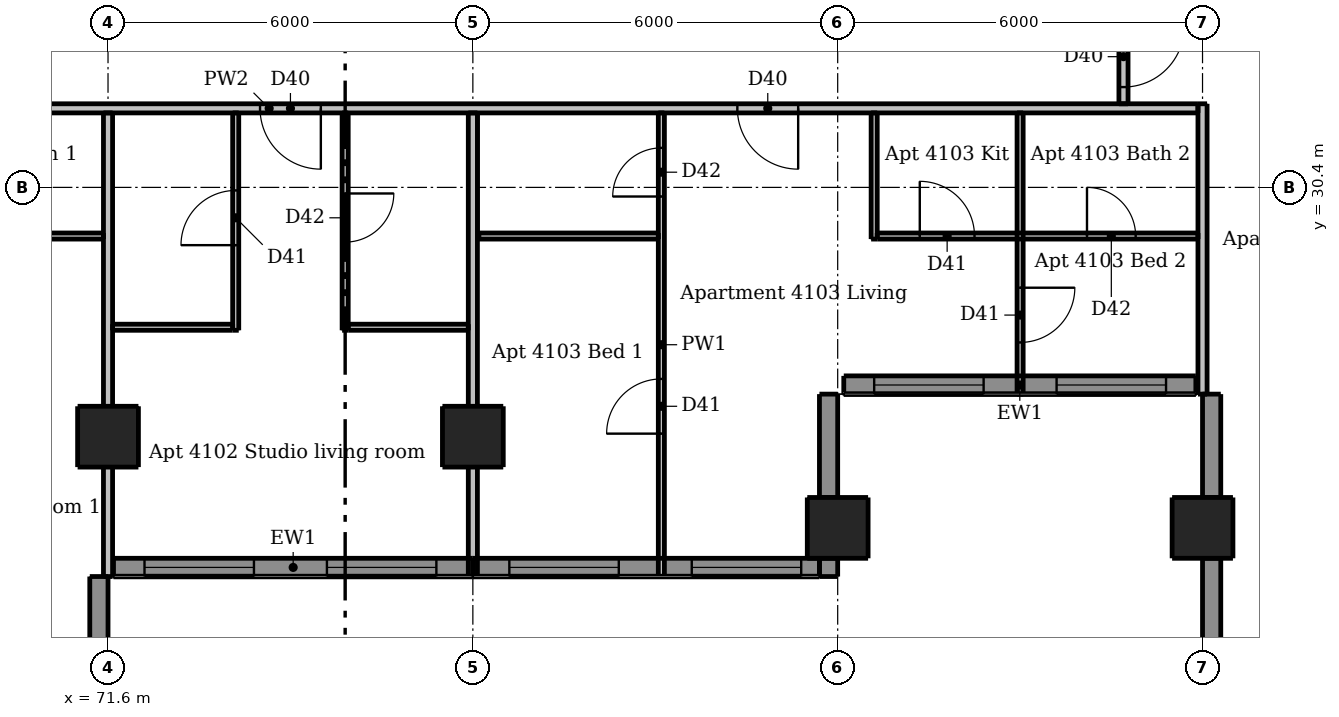
"""IFC4 building model, lengths in metres.
Left out: names, types, materials, properties, quantities, classifications, styles, units other than length and angle.
Written with IfcOpenShell. Run it as: python <this file> out.ifc"""

import sys

from ifc_helpers import new_model, si_unit, direction, frame, frame_2d, origin, origin_2d, place, context, subcontext, project, spatial, rectangle, extrude, element, fill, save


model = new_model("IFC4")
c1 = context("Model", 3, precision=1e-05, world=origin(), true_north=direction((0.0, 1.0)))
c2 = subcontext(c1, "Body", "Model", "MODEL_VIEW")
j1 = project(units=[si_unit("LENGTHUNIT", "METRE"), si_unit("PLANEANGLEUNIT", "RADIAN")], contexts=[c1])
p1 = place(None, origin())
s1 = spatial("IfcSite", under=j1, at=p1, CompositionType="ELEMENT")
p2 = place(p1, origin())
s2 = spatial("IfcBuilding", under=s1, at=p2, CompositionType="ELEMENT")
p3 = place(p2, frame((0.0, 0.0, 154.9)))
s3 = spatial("IfcBuildingStorey", under=s2, at=p3, CompositionType="ELEMENT", Elevation=154.9)
for number, where, z_axis, x_axis in (
    (1, (71.6, 26.3, 0.0), (0.0, 0.0, 1.0), (1.0, 0.0, 0.0)),
    (2, (77.6, 26.3, 0.0), (0.0, 0.0, 1.0), (1.0, 0.0, 0.0)),
    (3, (83.6, 24.8, 0.0), (0.0, 0.0, 1.0), (1.0, 0.0, 0.0)),
    (4, (89.6, 24.8, 0.0), (0.0, 0.0, 1.0), (1.0, 0.0, 0.0)),
):
    element("IfcColumn", number, at=place(p3, frame(where, z_axis=z_axis, x_axis=x_axis)), inside=s3, PredefinedType="COLUMN", context=c2, shape_type="SweptSolid", body=[
        extrude(rectangle(XDim=1.0, YDim=1.0, at=origin_2d()), origin(), (0.0, 0.0, 1.0), 3.05),
    ])
p4 = place(p3, frame((71.45, 22.5, 0.0), z_axis=(0.0, 0.0, 1.0), x_axis=(0.0, 1.0, 0.0)))
e5 = element("IfcWall", 5, at=p4, inside=s3, PredefinedType="SOLIDWALL", context=c2, shape_type="SweptSolid", body=[
    extrude(rectangle(XDim=1.5, YDim=0.3, at=frame_2d((0.75, 0.0))), origin(), (0.0, 0.0, 1.0), 3.05),
])
p5 = place(p3, frame((83.45, 24.0, 0.0), z_axis=(0.0, 0.0, 1.0), x_axis=(0.0, 1.0, 0.0)))
e6 = element("IfcWall", 6, at=p5, inside=s3, PredefinedType="SOLIDWALL", context=c2, shape_type="SweptSolid", body=[
    extrude(rectangle(XDim=0.3, YDim=0.3, at=frame_2d((0.15, 0.0))), origin(), (0.0, 0.0, 1.0), 3.05),
])
for number, where, z_axis, x_axis in (
    (7, (83.45, 25.3, 0.0), (0.0, 0.0, 1.0), (0.0, 1.0, 0.0)),
    (8, (89.75, 27.0, 0.0), (0.0, 0.0, 1.0), (0.0, -1.0, 0.0)),
):
    element("IfcWall", number, at=place(p3, frame(where, z_axis=z_axis, x_axis=x_axis)), inside=s3, PredefinedType="SOLIDWALL", context=c2, shape_type="SweptSolid", body=[
        extrude(rectangle(XDim=1.7, YDim=0.3, at=frame_2d((0.85, 0.0))), origin(), (0.0, 0.0, 1.0), 3.05),
    ])
p6 = place(p3, frame((89.75, 24.3, 0.0), z_axis=(0.0, 0.0, 1.0), x_axis=(0.0, -1.0, 0.0)))
e9 = element("IfcWall", 9, at=p6, inside=s3, PredefinedType="SOLIDWALL", context=c2, shape_type="SweptSolid", body=[
    extrude(rectangle(XDim=1.8, YDim=0.3, at=frame_2d((0.9, 0.0))), origin(), (0.0, 0.0, 1.0), 3.05),
])
p7 = place(p3, frame((71.69, 24.15, 0.0), z_axis=(0.0, 0.0, 1.0), x_axis=(1.0, 0.0, 0.0)))
e10 = element("IfcWall", 10, at=p7, inside=s3, PredefinedType="SOLIDWALL", context=c2, shape_type="SweptSolid", body=[
    extrude(rectangle(XDim=5.91, YDim=0.3, at=frame_2d((2.955, 0.0))), origin(), (0.0, 0.0, 1.0), 3.05),
])
p8 = place(p7, frame((0.51, 0.0, 0.15)))
e11 = element("IfcOpeningElement", 11, at=p8, cuts=e10, PredefinedType="OPENING", context=c2, shape_type="SweptSolid", body=[
    extrude(rectangle(XDim=1.8, YDim=2.1, at=frame_2d((0.9, 1.05))), frame((0.0, 0.16, 0.0), z_axis=(0.0, -1.0, 0.0), x_axis=(1.0, 0.0, 0.0)), (0.0, 0.0, 1.0), 0.32),
])
p9 = place(p7, frame((3.51, 0.0, 0.15)))
e12 = element("IfcOpeningElement", 12, at=p9, cuts=e10, PredefinedType="OPENING", context=c2, shape_type="SweptSolid", body=[
    extrude(rectangle(XDim=1.8, YDim=2.1, at=frame_2d((0.9, 1.05))), frame((0.0, 0.16, 0.0), z_axis=(0.0, -1.0, 0.0), x_axis=(1.0, 0.0, 0.0)), (0.0, 0.0, 1.0), 0.32),
])
p10 = place(p3, frame((77.6, 24.15, 0.0), z_axis=(0.0, 0.0, 1.0), x_axis=(1.0, 0.0, 0.0)))
e13 = element("IfcWall", 13, at=p10, inside=s3, PredefinedType="SOLIDWALL", context=c2, shape_type="SweptSolid", body=[
    extrude(rectangle(XDim=5.7, YDim=0.3, at=frame_2d((2.85, 0.0))), origin(), (0.0, 0.0, 1.0), 3.05),
])
p11 = place(p10, frame((0.6, 0.0, 0.15)))
e14 = element("IfcOpeningElement", 14, at=p11, cuts=e13, PredefinedType="OPENING", context=c2, shape_type="SweptSolid", body=[
    extrude(rectangle(XDim=1.8, YDim=2.1, at=frame_2d((0.9, 1.05))), frame((0.0, 0.16, 0.0), z_axis=(0.0, -1.0, 0.0), x_axis=(1.0, 0.0, 0.0)), (0.0, 0.0, 1.0), 0.32),
])
p12 = place(p10, frame((3.6, 0.0, 0.15)))
e15 = element("IfcOpeningElement", 15, at=p12, cuts=e13, PredefinedType="OPENING", context=c2, shape_type="SweptSolid", body=[
    extrude(rectangle(XDim=1.8, YDim=2.1, at=frame_2d((0.9, 1.05))), frame((0.0, 0.16, 0.0), z_axis=(0.0, -1.0, 0.0), x_axis=(1.0, 0.0, 0.0)), (0.0, 0.0, 1.0), 0.32),
])
p13 = place(p3, frame((83.7, 27.15, 0.0), z_axis=(0.0, 0.0, 1.0), x_axis=(1.0, 0.0, 0.0)))
e16 = element("IfcWall", 16, at=p13, inside=s3, PredefinedType="SOLIDWALL", context=c2, shape_type="SweptSolid", body=[
    extrude(rectangle(XDim=5.79, YDim=0.3, at=frame_2d((2.895, 0.0))), origin(), (0.0, 0.0, 1.0), 3.05),
])
p14 = place(p13, frame((0.5, 0.0, 0.15)))
e17 = element("IfcOpeningElement", 17, at=p14, cuts=e16, PredefinedType="OPENING", context=c2, shape_type="SweptSolid", body=[
    extrude(rectangle(XDim=1.8, YDim=2.1, at=frame_2d((0.9, 1.05))), frame((0.0, 0.16, 0.0), z_axis=(0.0, -1.0, 0.0), x_axis=(1.0, 0.0, 0.0)), (0.0, 0.0, 1.0), 0.32),
])
p15 = place(p13, frame((3.5, 0.0, 0.15)))
e18 = element("IfcOpeningElement", 18, at=p15, cuts=e16, PredefinedType="OPENING", context=c2, shape_type="SweptSolid", body=[
    extrude(rectangle(XDim=1.8, YDim=2.1, at=frame_2d((0.9, 1.05))), frame((0.0, 0.16, 0.0), z_axis=(0.0, -1.0, 0.0), x_axis=(1.0, 0.0, 0.0)), (0.0, 0.0, 1.0), 0.32),
])
p16 = place(p3, frame((73.7, 28.05, 0.0), z_axis=(0.0, 0.0, 1.0), x_axis=(0.0, 1.0, 0.0)))
e19 = element("IfcWall", 19, at=p16, inside=s3, PredefinedType="PARTITIONING", context=c2, shape_type="SweptSolid", body=[
    extrude(rectangle(XDim=3.575, YDim=0.1, at=frame_2d((1.788, 0.0))), origin(), (0.0, 0.0, 1.0), 3.05),
])
p17 = place(p16, frame((1.4, 0.0, 0.0)))
e20 = element("IfcOpeningElement", 20, at=p17, cuts=e19, PredefinedType="OPENING", context=c2, shape_type="SweptSolid", body=[
    extrude(rectangle(XDim=0.9, YDim=2.1, at=frame_2d((0.45, 1.05))), frame((0.0, 0.06, 0.0), z_axis=(0.0, -1.0, 0.0), x_axis=(1.0, 0.0, 0.0)), (0.0, 0.0, 1.0), 0.12),
])
p18 = place(p3, frame((75.5, 31.625, 0.0), z_axis=(0.0, 0.0, 1.0), x_axis=(0.0, -1.0, 0.0)))
e21 = element("IfcWall", 21, at=p18, inside=s3, PredefinedType="PARTITIONING", context=c2, shape_type="SweptSolid", body=[
    extrude(rectangle(XDim=3.575, YDim=0.1, at=frame_2d((1.788, 0.0))), origin(), (0.0, 0.0, 1.0), 3.05),
])
p19 = place(p18, frame((1.325, 0.0, 0.0)))
e22 = element("IfcOpeningElement", 22, at=p19, cuts=e21, PredefinedType="OPENING", context=c2, shape_type="SweptSolid", body=[
    extrude(rectangle(XDim=0.8, YDim=2.1, at=frame_2d((0.4, 1.05))), frame((0.0, 0.06, 0.0), z_axis=(0.0, -1.0, 0.0), x_axis=(1.0, 0.0, 0.0)), (0.0, 0.0, 1.0), 0.12),
])
p20 = place(p3, frame((80.7, 24.0, 0.0), z_axis=(0.0, 0.0, 1.0), x_axis=(0.0, 1.0, 0.0)))
e23 = element("IfcWall", 23, at=p20, inside=s3, PredefinedType="PARTITIONING", context=c2, shape_type="SweptSolid", body=[
    extrude(rectangle(XDim=7.625, YDim=0.1, at=frame_2d((3.812, 0.0))), origin(), (0.0, 0.0, 1.0), 3.05),
])
p21 = place(p20, frame((2.35, 0.0, 0.0)))
e24 = element("IfcOpeningElement", 24, at=p21, cuts=e23, PredefinedType="OPENING", context=c2, shape_type="SweptSolid", body=[
    extrude(rectangle(XDim=0.9, YDim=2.1, at=frame_2d((0.45, 1.05))), frame((0.0, 0.06, 0.0), z_axis=(0.0, -1.0, 0.0), x_axis=(1.0, 0.0, 0.0)), (0.0, 0.0, 1.0), 0.12),
])
p22 = place(p20, frame((6.25, 0.0, 0.0)))
e25 = element("IfcOpeningElement", 25, at=p22, cuts=e23, PredefinedType="OPENING", context=c2, shape_type="SweptSolid", body=[
    extrude(rectangle(XDim=0.8, YDim=2.1, at=frame_2d((0.4, 1.05))), frame((0.0, 0.06, 0.0), z_axis=(0.0, -1.0, 0.0), x_axis=(1.0, 0.0, 0.0)), (0.0, 0.0, 1.0), 0.12),
])
p23 = place(p3, frame((84.2, 29.55, 0.0), z_axis=(0.0, 0.0, 1.0), x_axis=(0.0, 1.0, 0.0)))
e26 = element("IfcWall", 26, at=p23, inside=s3, PredefinedType="PARTITIONING", context=c2, shape_type="SweptSolid", body=[
    extrude(rectangle(XDim=2.075, YDim=0.1, at=frame_2d((1.038, 0.0))), origin(), (0.0, 0.0, 1.0), 3.05),
])
p24 = place(p3, frame((86.6, 31.625, 0.0), z_axis=(0.0, 0.0, 1.0), x_axis=(0.0, -1.0, 0.0)))
e27 = element("IfcWall", 27, at=p24, inside=s3, PredefinedType="PARTITIONING", context=c2, shape_type="SweptSolid", body=[
    extrude(rectangle(XDim=4.625, YDim=0.1, at=frame_2d((2.312, 0.0))), origin(), (0.0, 0.0, 1.0), 3.05),
])
p25 = place(p24, frame((2.875, 0.0, 0.0)))
e28 = element("IfcOpeningElement", 28, at=p25, cuts=e27, PredefinedType="OPENING", context=c2, shape_type="SweptSolid", body=[
    extrude(rectangle(XDim=0.9, YDim=2.1, at=frame_2d((0.45, 1.05))), frame((0.0, 0.06, 0.0), z_axis=(0.0, -1.0, 0.0), x_axis=(1.0, 0.0, 0.0)), (0.0, 0.0, 1.0), 0.12),
])
p26 = place(p3, frame((65.65, 29.6, 0.0), z_axis=(0.0, 0.0, 1.0), x_axis=(1.0, 0.0, 0.0)))
e29 = element("IfcWall", 29, at=p26, inside=s3, PredefinedType="PARTITIONING", context=c2, shape_type="SweptSolid", body=[
    extrude(rectangle(XDim=5.875, YDim=0.1, at=frame_2d((2.938, 0.0))), origin(), (0.0, 0.0, 1.0), 3.05),
])
p27 = place(p26, frame((3.75, 0.0, 0.0)))
e30 = element("IfcOpeningElement", 30, at=p27, cuts=e29, PredefinedType="OPENING", context=c2, shape_type="SweptSolid", body=[
    extrude(rectangle(XDim=0.8, YDim=2.1, at=frame_2d((0.4, 1.05))), frame((0.0, 0.06, 0.0), z_axis=(0.0, -1.0, 0.0), x_axis=(1.0, 0.0, 0.0)), (0.0, 0.0, 1.0), 0.12),
])
p28 = place(p3, frame((77.7, 29.6, 0.0), z_axis=(0.0, 0.0, 1.0), x_axis=(1.0, 0.0, 0.0)))
e31 = element("IfcWall", 31, at=p28, inside=s3, PredefinedType="PARTITIONING", context=c2, shape_type="SweptSolid", body=[
    extrude(rectangle(XDim=2.95, YDim=0.1, at=frame_2d((1.475, 0.0))), origin(), (0.0, 0.0, 1.0), 3.05),
])
p29 = place(p3, frame((84.25, 29.6, 0.0), z_axis=(0.0, 0.0, 1.0), x_axis=(1.0, 0.0, 0.0)))
e32 = element("IfcWall", 32, at=p29, inside=s3, PredefinedType="PARTITIONING", context=c2, shape_type="SweptSolid", body=[
    extrude(rectangle(XDim=5.275, YDim=0.1, at=frame_2d((2.637, 0.0))), origin(), (0.0, 0.0, 1.0), 3.05),
])
p30 = place(p29, frame((0.7, 0.0, 0.0)))
e33 = element("IfcOpeningElement", 33, at=p30, cuts=e32, PredefinedType="OPENING", context=c2, shape_type="SweptSolid", body=[
    extrude(rectangle(XDim=0.9, YDim=2.1, at=frame_2d((0.45, 1.05))), frame((0.0, 0.06, 0.0), z_axis=(0.0, -1.0, 0.0), x_axis=(1.0, 0.0, 0.0)), (0.0, 0.0, 1.0), 0.12),
])
p31 = place(p29, frame((3.45, 0.0, 0.0)))
e34 = element("IfcOpeningElement", 34, at=p31, cuts=e32, PredefinedType="OPENING", context=c2, shape_type="SweptSolid", body=[
    extrude(rectangle(XDim=0.8, YDim=2.1, at=frame_2d((0.4, 1.05))), frame((0.0, 0.06, 0.0), z_axis=(0.0, -1.0, 0.0), x_axis=(1.0, 0.0, 0.0)), (0.0, 0.0, 1.0), 0.12),
])
for number, where, z_axis, x_axis in (
    (35, (71.675, 28.1, 0.0), (0.0, 0.0, 1.0), (1.0, 0.0, 0.0)),
    (36, (75.55, 28.1, 0.0), (0.0, 0.0, 1.0), (1.0, 0.0, 0.0)),
):
    element("IfcWall", number, at=place(p3, frame(where, z_axis=z_axis, x_axis=x_axis)), inside=s3, PredefinedType="PARTITIONING", context=c2, shape_type="SweptSolid", body=[
        extrude(rectangle(XDim=1.975, YDim=0.1, at=frame_2d((0.987, 0.0))), origin(), (0.0, 0.0, 1.0), 3.05),
    ])
for number, where, z_axis, x_axis in (
    (37, (71.6, 24.0, 0.0), (0.0, 0.0, 1.0), (0.0, 1.0, 0.0)),
    (38, (77.6, 24.0, 0.0), (0.0, 0.0, 1.0), (0.0, 1.0, 0.0)),
):
    element("IfcWall", number, at=place(p3, frame(where, z_axis=z_axis, x_axis=x_axis)), inside=s3, PredefinedType="PARTITIONING", context=c2, shape_type="SweptSolid", body=[
        extrude(rectangle(XDim=7.625, YDim=0.15, at=frame_2d((3.812, 0.0))), origin(), (0.0, 0.0, 1.0), 2.59),
    ])
p32 = place(p3, frame((88.3, 61.175, 0.0), z_axis=(0.0, 0.0, 1.0), x_axis=(0.0, -1.0, 0.0)))
e39 = element("IfcWall", 39, at=p32, inside=s3, PredefinedType="PARTITIONING", context=c2, shape_type="SweptSolid", body=[
    extrude(rectangle(XDim=29.4, YDim=0.15, at=frame_2d((14.7, 0.0))), origin(), (0.0, 0.0, 1.0), 3.05),
])
p33 = place(p32, frame((28.125, 0.0, 0.0)))
e40 = element("IfcOpeningElement", 40, at=p33, cuts=e39, PredefinedType="OPENING", context=c2, shape_type="SweptSolid", body=[
    extrude(rectangle(XDim=1.0, YDim=2.1, at=frame_2d((0.5, 1.05))), frame((0.0, 0.085, 0.0), z_axis=(0.0, -1.0, 0.0), x_axis=(1.0, 0.0, 0.0)), (0.0, 0.0, 1.0), 0.17),
])
p34 = place(p32, frame((18.275, 0.0, 0.0)))
e41 = element("IfcOpeningElement", 41, at=p34, cuts=e39, PredefinedType="OPENING", context=c2, shape_type="SweptSolid", body=[
    extrude(rectangle(XDim=1.0, YDim=2.1, at=frame_2d((0.5, 1.05))), frame((0.0, 0.085, 0.0), z_axis=(0.0, -1.0, 0.0), x_axis=(1.0, 0.0, 0.0)), (0.0, 0.0, 1.0), 0.17),
])
p35 = place(p32, frame((10.475, 0.0, 0.0)))
e42 = element("IfcOpeningElement", 42, at=p35, cuts=e39, PredefinedType="OPENING", context=c2, shape_type="SweptSolid", body=[
    extrude(rectangle(XDim=1.0, YDim=2.1, at=frame_2d((0.5, 1.05))), frame((0.0, 0.085, 0.0), z_axis=(0.0, -1.0, 0.0), x_axis=(1.0, 0.0, 0.0)), (0.0, 0.0, 1.0), 0.17),
])
p36 = place(p32, frame((3.275, 0.0, 0.0)))
e43 = element("IfcOpeningElement", 43, at=p36, cuts=e39, PredefinedType="OPENING", context=c2, shape_type="SweptSolid", body=[
    extrude(rectangle(XDim=1.0, YDim=2.1, at=frame_2d((0.5, 1.05))), frame((0.0, 0.085, 0.0), z_axis=(0.0, -1.0, 0.0), x_axis=(1.0, 0.0, 0.0)), (0.0, 0.0, 1.0), 0.17),
])
p37 = place(p3, frame((89.6, 27.0, 0.0), z_axis=(0.0, 0.0, 1.0), x_axis=(0.0, 1.0, 0.0)))
e44 = element("IfcWall", 44, at=p37, inside=s3, PredefinedType="PARTITIONING", context=c2, shape_type="SweptSolid", body=[
    extrude(rectangle(XDim=4.775, YDim=0.15, at=frame_2d((2.387, 0.0))), origin(), (0.0, 0.0, 1.0), 2.51),
])
p38 = place(p3, frame((89.525, 31.7, 0.0), z_axis=(0.0, 0.0, 1.0), x_axis=(-1.0, 0.0, 0.0)))
e45 = element("IfcWall", 45, at=p38, inside=s3, PredefinedType="PARTITIONING", context=c2, shape_type="SweptSolid", body=[
    extrude(rectangle(XDim=30.55, YDim=0.15, at=frame_2d((15.275, 0.0))), origin(), (0.0, 0.0, 1.0), 3.05),
])
p39 = place(p38, frame((26.775, 0.0, 0.0)))
e46 = element("IfcOpeningElement", 46, at=p39, cuts=e45, PredefinedType="OPENING", context=c2, shape_type="SweptSolid", body=[
    extrude(rectangle(XDim=1.0, YDim=2.1, at=frame_2d((0.5, 1.05))), frame((0.0, 0.085, 0.0), z_axis=(0.0, -1.0, 0.0), x_axis=(1.0, 0.0, 0.0)), (0.0, 0.0, 1.0), 0.17),
])
p40 = place(p38, frame((14.425, 0.0, 0.0)))
e47 = element("IfcOpeningElement", 47, at=p40, cuts=e45, PredefinedType="OPENING", context=c2, shape_type="SweptSolid", body=[
    extrude(rectangle(XDim=1.0, YDim=2.1, at=frame_2d((0.5, 1.05))), frame((0.0, 0.085, 0.0), z_axis=(0.0, -1.0, 0.0), x_axis=(1.0, 0.0, 0.0)), (0.0, 0.0, 1.0), 0.17),
])
p41 = place(p38, frame((6.575, 0.0, 0.0)))
e48 = element("IfcOpeningElement", 48, at=p41, cuts=e45, PredefinedType="OPENING", context=c2, shape_type="SweptSolid", body=[
    extrude(rectangle(XDim=1.0, YDim=2.1, at=frame_2d((0.5, 1.05))), frame((0.0, 0.085, 0.0), z_axis=(0.0, -1.0, 0.0), x_axis=(1.0, 0.0, 0.0)), (0.0, 0.0, 1.0), 0.17),
])
p42 = place(p8, origin())
e49 = element("IfcWindow", 49, at=p42, inside=s3, PartitioningType="DOUBLE_PANEL_VERTICAL", PredefinedType="WINDOW", context=c2, shape_type="SweptSolid", body=[
    extrude(rectangle(XDim=1.8, YDim=2.1, at=frame_2d((0.9, 1.05))), frame((0.0, 0.03, 0.0), z_axis=(0.0, -1.0, 0.0), x_axis=(1.0, 0.0, 0.0)), (0.0, 0.0, 1.0), 0.06),
])
fill(e11, e49)
p43 = place(p9, origin())
e50 = element("IfcWindow", 50, at=p43, inside=s3, PartitioningType="DOUBLE_PANEL_VERTICAL", PredefinedType="WINDOW", context=c2, shape_type="SweptSolid", body=[
    extrude(rectangle(XDim=1.8, YDim=2.1, at=frame_2d((0.9, 1.05))), frame((0.0, 0.03, 0.0), z_axis=(0.0, -1.0, 0.0), x_axis=(1.0, 0.0, 0.0)), (0.0, 0.0, 1.0), 0.06),
])
fill(e12, e50)
p44 = place(p11, origin())
e51 = element("IfcWindow", 51, at=p44, inside=s3, PartitioningType="DOUBLE_PANEL_VERTICAL", PredefinedType="WINDOW", context=c2, shape_type="SweptSolid", body=[
    extrude(rectangle(XDim=1.8, YDim=2.1, at=frame_2d((0.9, 1.05))), frame((0.0, 0.03, 0.0), z_axis=(0.0, -1.0, 0.0), x_axis=(1.0, 0.0, 0.0)), (0.0, 0.0, 1.0), 0.06),
])
fill(e14, e51)
p45 = place(p12, origin())
e52 = element("IfcWindow", 52, at=p45, inside=s3, PartitioningType="DOUBLE_PANEL_VERTICAL", PredefinedType="WINDOW", context=c2, shape_type="SweptSolid", body=[
    extrude(rectangle(XDim=1.8, YDim=2.1, at=frame_2d((0.9, 1.05))), frame((0.0, 0.03, 0.0), z_axis=(0.0, -1.0, 0.0), x_axis=(1.0, 0.0, 0.0)), (0.0, 0.0, 1.0), 0.06),
])
fill(e15, e52)
p46 = place(p14, origin())
e53 = element("IfcWindow", 53, at=p46, inside=s3, PartitioningType="DOUBLE_PANEL_VERTICAL", PredefinedType="WINDOW", context=c2, shape_type="SweptSolid", body=[
    extrude(rectangle(XDim=1.8, YDim=2.1, at=frame_2d((0.9, 1.05))), frame((0.0, 0.03, 0.0), z_axis=(0.0, -1.0, 0.0), x_axis=(1.0, 0.0, 0.0)), (0.0, 0.0, 1.0), 0.06),
])
fill(e17, e53)
p47 = place(p15, origin())
e54 = element("IfcWindow", 54, at=p47, inside=s3, PartitioningType="DOUBLE_PANEL_VERTICAL", PredefinedType="WINDOW", context=c2, shape_type="SweptSolid", body=[
    extrude(rectangle(XDim=1.8, YDim=2.1, at=frame_2d((0.9, 1.05))), frame((0.0, 0.03, 0.0), z_axis=(0.0, -1.0, 0.0), x_axis=(1.0, 0.0, 0.0)), (0.0, 0.0, 1.0), 0.06),
])
fill(e18, e54)
p48 = place(p40, origin())
e55 = element("IfcDoor", 55, at=p48, inside=s3, OperationType="SINGLE_SWING_LEFT", PredefinedType="DOOR", context=c2, shape_type="SweptSolid", body=[
    extrude(rectangle(XDim=1.0, YDim=2.1, at=frame_2d((0.5, 1.05))), frame((0.0, 0.025, 0.0), z_axis=(0.0, -1.0, 0.0), x_axis=(1.0, 0.0, 0.0)), (0.0, 0.0, 1.0), 0.05),
])
fill(e47, e55)
p49 = place(p17, origin())
e56 = element("IfcDoor", 56, at=p49, inside=s3, OperationType="SINGLE_SWING_LEFT", PredefinedType="DOOR", context=c2, shape_type="SweptSolid", body=[
    extrude(rectangle(XDim=0.9, YDim=2.1, at=frame_2d((0.45, 1.05))), frame((0.0, 0.025, 0.0), z_axis=(0.0, -1.0, 0.0), x_axis=(1.0, 0.0, 0.0)), (0.0, 0.0, 1.0), 0.05),
])
fill(e20, e56)
p50 = place(p19, origin())
e57 = element("IfcDoor", 57, at=p50, inside=s3, OperationType="SINGLE_SWING_LEFT", PredefinedType="DOOR", context=c2, shape_type="SweptSolid", body=[
    extrude(rectangle(XDim=0.8, YDim=2.1, at=frame_2d((0.4, 1.05))), frame((0.0, 0.025, 0.0), z_axis=(0.0, -1.0, 0.0), x_axis=(1.0, 0.0, 0.0)), (0.0, 0.0, 1.0), 0.05),
])
fill(e22, e57)
p51 = place(p41, origin())
e58 = element("IfcDoor", 58, at=p51, inside=s3, OperationType="SINGLE_SWING_LEFT", PredefinedType="DOOR", context=c2, shape_type="SweptSolid", body=[
    extrude(rectangle(XDim=1.0, YDim=2.1, at=frame_2d((0.5, 1.05))), frame((0.0, 0.025, 0.0), z_axis=(0.0, -1.0, 0.0), x_axis=(1.0, 0.0, 0.0)), (0.0, 0.0, 1.0), 0.05),
])
fill(e48, e58)
p52 = place(p30, origin())
e59 = element("IfcDoor", 59, at=p52, inside=s3, OperationType="SINGLE_SWING_LEFT", PredefinedType="DOOR", context=c2, shape_type="SweptSolid", body=[
    extrude(rectangle(XDim=0.9, YDim=2.1, at=frame_2d((0.45, 1.05))), frame((0.0, 0.025, 0.0), z_axis=(0.0, -1.0, 0.0), x_axis=(1.0, 0.0, 0.0)), (0.0, 0.0, 1.0), 0.05),
])
fill(e33, e59)
p53 = place(p21, origin())
e60 = element("IfcDoor", 60, at=p53, inside=s3, OperationType="SINGLE_SWING_LEFT", PredefinedType="DOOR", context=c2, shape_type="SweptSolid", body=[
    extrude(rectangle(XDim=0.9, YDim=2.1, at=frame_2d((0.45, 1.05))), frame((0.0, 0.025, 0.0), z_axis=(0.0, -1.0, 0.0), x_axis=(1.0, 0.0, 0.0)), (0.0, 0.0, 1.0), 0.05),
])
fill(e24, e60)
p54 = place(p22, origin())
e61 = element("IfcDoor", 61, at=p54, inside=s3, OperationType="SINGLE_SWING_LEFT", PredefinedType="DOOR", context=c2, shape_type="SweptSolid", body=[
    extrude(rectangle(XDim=0.8, YDim=2.1, at=frame_2d((0.4, 1.05))), frame((0.0, 0.025, 0.0), z_axis=(0.0, -1.0, 0.0), x_axis=(1.0, 0.0, 0.0)), (0.0, 0.0, 1.0), 0.05),
])
fill(e25, e61)
p55 = place(p25, origin())
e62 = element("IfcDoor", 62, at=p55, inside=s3, OperationType="SINGLE_SWING_LEFT", PredefinedType="DOOR", context=c2, shape_type="SweptSolid", body=[
    extrude(rectangle(XDim=0.9, YDim=2.1, at=frame_2d((0.45, 1.05))), frame((0.0, 0.025, 0.0), z_axis=(0.0, -1.0, 0.0), x_axis=(1.0, 0.0, 0.0)), (0.0, 0.0, 1.0), 0.05),
])
fill(e28, e62)
p56 = place(p31, origin())
e63 = element("IfcDoor", 63, at=p56, inside=s3, OperationType="SINGLE_SWING_LEFT", PredefinedType="DOOR", context=c2, shape_type="SweptSolid", body=[
    extrude(rectangle(XDim=0.8, YDim=2.1, at=frame_2d((0.4, 1.05))), frame((0.0, 0.025, 0.0), z_axis=(0.0, -1.0, 0.0), x_axis=(1.0, 0.0, 0.0)), (0.0, 0.0, 1.0), 0.05),
])
fill(e34, e63)
p57 = place(p33, origin())
e64 = element("IfcDoor", 64, at=p57, inside=s3, OperationType="SINGLE_SWING_LEFT", PredefinedType="DOOR", context=c2, shape_type="SweptSolid", body=[
    extrude(rectangle(XDim=1.0, YDim=2.1, at=frame_2d((0.5, 1.05))), frame((0.0, 0.025, 0.0), z_axis=(0.0, -1.0, 0.0), x_axis=(1.0, 0.0, 0.0)), (0.0, 0.0, 1.0), 0.05),
])
fill(e40, e64)
save(model, sys.argv[1])
